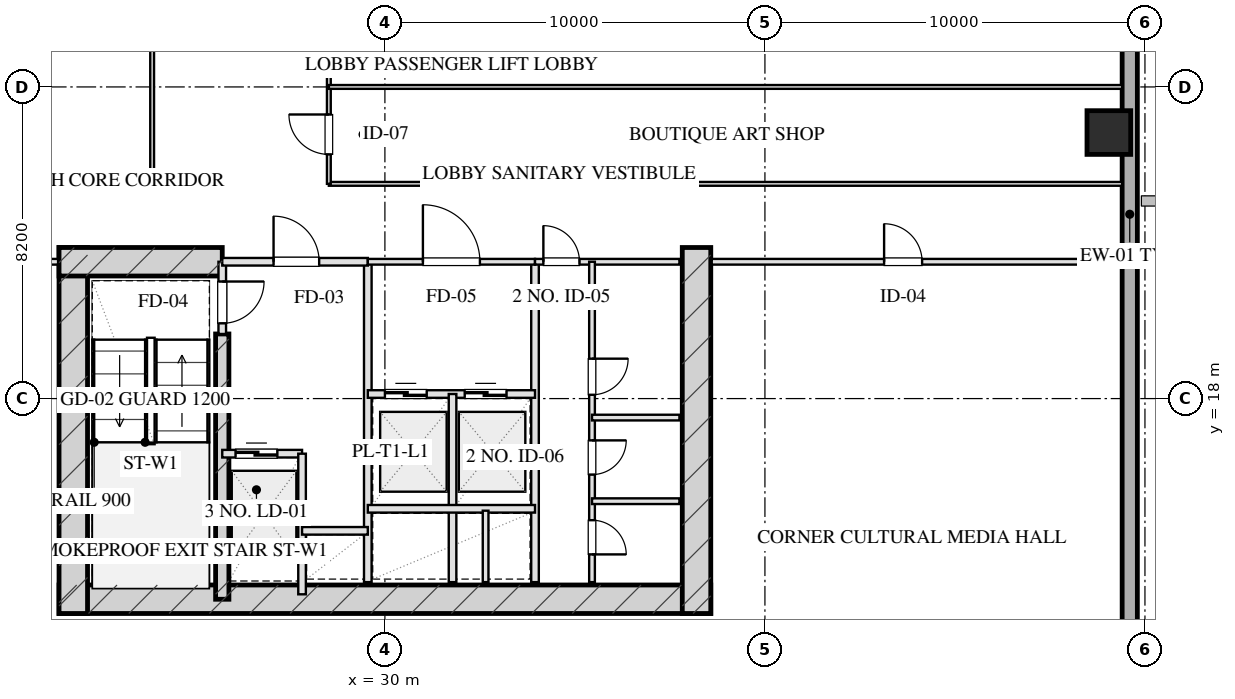
"""IFC4 building model, lengths in metres.
Left out: names, types, materials, properties, quantities, classifications, styles, units other than length and angle.
Written with IfcOpenShell. Run it as: python <this file> out.ifc"""

import sys

from ifc_helpers import new_model, si_unit, direction, frame, frame_2d, origin, origin_2d, place, context, subcontext, project, spatial, rectangle, hollow_rectangle, extrude, element, fill, save


model = new_model("IFC4")
c1 = context("Model", 3, precision=1e-05, world=origin(), true_north=direction((0.0, 1.0)))
c2 = subcontext(c1, "Body", "Model", "MODEL_VIEW")
j1 = project(units=[si_unit("LENGTHUNIT", "METRE"), si_unit("PLANEANGLEUNIT", "RADIAN")], contexts=[c1])
p1 = place(None, origin())
s1 = spatial("IfcSite", under=j1, at=p1, CompositionType="ELEMENT")
p2 = place(p1, origin())
s2 = spatial("IfcBuilding", under=s1, at=p2, CompositionType="ELEMENT")
p3 = place(p2, frame((0.0, 0.0, 78.2)))
s3 = spatial("IfcBuildingStorey", under=s2, at=p3, CompositionType="ELEMENT", Elevation=78.2)
p4 = place(p3, frame((21.425, 12.72, 0.0), z_axis=(0.0, 0.0, 1.0), x_axis=(1.0, 0.0, 0.0)))
e1 = element("IfcWall", 1, at=p4, inside=s3, PredefinedType="SHEAR", context=c2, shape_type="SweptSolid", body=[
    extrude(rectangle(XDim=17.15, YDim=0.75, at=frame_2d((8.575, 0.0))), origin(), (0.0, 0.0, 1.0), 3.45),
])
for number, where, z_axis, x_axis in (
    (2, (21.8, 21.975, 0.0), (0.0, 0.0, 1.0), (0.0, -1.0, 0.0)),
    (3, (38.2, 21.975, 0.0), (0.0, 0.0, 1.0), (0.0, -1.0, 0.0)),
):
    element("IfcWall", number, at=place(p3, frame(where, z_axis=z_axis, x_axis=x_axis)), inside=s3, PredefinedType="SHEAR", context=c2, shape_type="SweptSolid", body=[
        extrude(rectangle(XDim=9.63, YDim=0.75, at=frame_2d((4.815, 0.0))), origin(), (0.0, 0.0, 1.0), 3.45),
    ])
p5 = place(p3, frame((25.72, 19.7, 0.0), z_axis=(0.0, 0.0, 1.0), x_axis=(0.0, -1.0, 0.0)))
e4 = element("IfcWall", 4, at=p5, inside=s3, PredefinedType="SHEAR", context=c2, shape_type="SweptSolid", body=[
    extrude(rectangle(XDim=6.98, YDim=0.35, at=frame_2d((3.49, 0.0))), origin(), (0.0, 0.0, 1.0), 3.45),
])
p6 = place(p3, frame((21.425, 21.6, 0.0), z_axis=(0.0, 0.0, 1.0), x_axis=(1.0, 0.0, 0.0)))
e5 = element("IfcWall", 5, at=p6, inside=s3, PredefinedType="SHEAR", context=c2, shape_type="SweptSolid", body=[
    extrude(rectangle(XDim=4.295, YDim=0.75, at=frame_2d((2.147, 0.0))), origin(), (0.0, 0.0, 1.0), 3.45),
])
p7 = place(p3, frame((49.05, 25.0, 0.0), z_axis=(0.0, 0.0, 1.0), x_axis=(1.0, 0.0, 0.0)))
e6 = element("IfcColumn", 6, at=p7, inside=s3, PredefinedType="COLUMN", context=c2, shape_type="SweptSolid", body=[
    extrude(hollow_rectangle(XDim=1.15, YDim=1.15, WallThickness=0.04, at=origin_2d()), origin(), (0.0, 0.0, 1.0), 3.451),
])
p8 = place(p3, frame((49.6, 60.8, 0.0), z_axis=(0.0, 0.0, 1.0), x_axis=(0.0, -1.0, 0.0)))
e7 = element("IfcWall", 7, at=p8, inside=s3, PredefinedType="SOLIDWALL", context=c2, shape_type="SweptSolid", body=[
    extrude(rectangle(XDim=53.6, YDim=0.4, at=frame_2d((26.8, 0.0))), origin(), (0.0, 0.0, 1.0), 2.61),
])
p9 = place(p8, frame((20.45, 0.0, 0.0)))
e8 = element("IfcOpeningElement", 8, at=p9, cuts=e7, PredefinedType="OPENING", context=c2, shape_type="SweptSolid", body=[
    extrude(rectangle(XDim=1.1, YDim=2.15, at=frame_2d((0.55, 1.075))), frame((0.0, 0.21, 0.0), z_axis=(0.0, -1.0, 0.0), x_axis=(1.0, 0.0, 0.0)), (0.0, 0.0, 1.0), 0.42),
])
p10 = place(p3, frame((25.72, 21.6, 0.0), z_axis=(0.0, 0.0, 1.0), x_axis=(0.0, -1.0, 0.0)))
e9 = element("IfcWall", 9, at=p10, inside=s3, PredefinedType="PARTITIONING", context=c2, shape_type="SweptSolid", body=[
    extrude(rectangle(XDim=1.9, YDim=0.2, at=frame_2d((0.95, 0.0))), origin(), (0.0, 0.0, 1.0), 3.175),
])
p11 = place(p10, frame((0.52, 0.0, 0.0)))
e10 = element("IfcOpeningElement", 10, at=p11, cuts=e9, PredefinedType="OPENING", context=c2, shape_type="SweptSolid", body=[
    extrude(rectangle(XDim=1.1, YDim=2.05, at=frame_2d((0.55, 1.025))), frame((0.0, 0.11, 0.0), z_axis=(0.0, -1.0, 0.0), x_axis=(1.0, 0.0, 0.0)), (0.0, 0.0, 1.0), 0.22),
])
p12 = place(p3, frame((29.55, 21.6, 0.0), z_axis=(0.0, 0.0, 1.0), x_axis=(0.0, -1.0, 0.0)))
e11 = element("IfcWall", 11, at=p12, inside=s3, PredefinedType="PARTITIONING", context=c2, shape_type="SweptSolid", body=[
    extrude(rectangle(XDim=8.43, YDim=0.2, at=frame_2d((4.215, 0.0))), origin(), (0.0, 0.0, 1.0), 3.175),
])
p13 = place(p3, frame((25.72, 21.6, 0.0), z_axis=(0.0, 0.0, 1.0), x_axis=(1.0, 0.0, 0.0)))
e12 = element("IfcWall", 12, at=p13, inside=s3, PredefinedType="PARTITIONING", context=c2, shape_type="SweptSolid", body=[
    extrude(rectangle(XDim=3.83, YDim=0.2, at=frame_2d((1.915, 0.0))), origin(), (0.0, 0.0, 1.0), 3.175),
])
p14 = place(p13, frame((1.35, 0.0, 0.0)))
e13 = element("IfcOpeningElement", 13, at=p14, cuts=e12, PredefinedType="OPENING", context=c2, shape_type="SweptSolid", body=[
    extrude(rectangle(XDim=1.2, YDim=2.05, at=frame_2d((0.6, 1.025))), frame((0.0, 0.11, 0.0), z_axis=(0.0, -1.0, 0.0), x_axis=(1.0, 0.0, 0.0)), (0.0, 0.0, 1.0), 0.22),
])
p15 = place(p3, frame((25.72, 16.55, 0.0), z_axis=(0.0, 0.0, 1.0), x_axis=(1.0, 0.0, 0.0)))
e14 = element("IfcWall", 14, at=p15, inside=s3, PredefinedType="PARTITIONING", context=c2, shape_type="SweptSolid", body=[
    extrude(rectangle(XDim=2.1, YDim=0.2, at=frame_2d((1.05, 0.0))), origin(), (0.0, 0.0, 1.0), 3.175),
])
p16 = place(p15, frame((0.35, 0.0, 0.0)))
e15 = element("IfcOpeningElement", 15, at=p16, cuts=e14, PredefinedType="OPENING", context=c2, shape_type="SweptSolid", body=[
    extrude(rectangle(XDim=1.1, YDim=2.05, at=frame_2d((0.55, 1.025))), frame((0.0, 0.11, 0.0), z_axis=(0.0, -1.0, 0.0), x_axis=(1.0, 0.0, 0.0)), (0.0, 0.0, 1.0), 0.22),
])
p17 = place(p3, frame((27.82, 16.55, 0.0), z_axis=(0.0, 0.0, 1.0), x_axis=(0.0, -1.0, 0.0)))
e16 = element("IfcWall", 16, at=p17, inside=s3, PredefinedType="PARTITIONING", context=c2, shape_type="SweptSolid", body=[
    extrude(rectangle(XDim=3.7, YDim=0.2, at=frame_2d((1.85, 0.0))), origin(), (0.0, 0.0, 1.0), 3.175),
])
p18 = place(p3, frame((27.82, 14.52, 0.0), z_axis=(0.0, 0.0, 1.0), x_axis=(1.0, 0.0, 0.0)))
e17 = element("IfcWall", 17, at=p18, inside=s3, PredefinedType="PARTITIONING", context=c2, shape_type="SweptSolid", body=[
    extrude(rectangle(XDim=1.73, YDim=0.2, at=frame_2d((0.865, 0.0))), origin(), (0.0, 0.0, 1.0), 3.175),
])
p19 = place(p3, frame((33.95, 21.6, 0.0), z_axis=(0.0, 0.0, 1.0), x_axis=(0.0, -1.0, 0.0)))
e18 = element("IfcWall", 18, at=p19, inside=s3, PredefinedType="PARTITIONING", context=c2, shape_type="SweptSolid", body=[
    extrude(rectangle(XDim=8.43, YDim=0.2, at=frame_2d((4.215, 0.0))), origin(), (0.0, 0.0, 1.0), 3.175),
])
p20 = place(p3, frame((29.55, 21.6, 0.0), z_axis=(0.0, 0.0, 1.0), x_axis=(1.0, 0.0, 0.0)))
e19 = element("IfcWall", 19, at=p20, inside=s3, PredefinedType="PARTITIONING", context=c2, shape_type="SweptSolid", body=[
    extrude(rectangle(XDim=4.4, YDim=0.15, at=frame_2d((2.2, 0.0))), origin(), (0.0, 0.0, 1.0), 3.175),
])
p21 = place(p20, frame((1.45, 0.0, 0.0)))
e20 = element("IfcOpeningElement", 20, at=p21, cuts=e19, PredefinedType="OPENING", context=c2, shape_type="SweptSolid", body=[
    extrude(rectangle(XDim=1.5, YDim=2.05, at=frame_2d((0.75, 1.025))), frame((0.0, 0.085, 0.0), z_axis=(0.0, -1.0, 0.0), x_axis=(1.0, 0.0, 0.0)), (0.0, 0.0, 1.0), 0.17),
])
p22 = place(p3, frame((29.55, 18.12, 0.0), z_axis=(0.0, 0.0, 1.0), x_axis=(1.0, 0.0, 0.0)))
e21 = element("IfcWall", 21, at=p22, inside=s3, PredefinedType="PARTITIONING", context=c2, shape_type="SweptSolid", body=[
    extrude(rectangle(XDim=4.4, YDim=0.2, at=frame_2d((2.2, 0.0))), origin(), (0.0, 0.0, 1.0), 3.175),
])
p23 = place(p22, frame((0.45, 0.0, 0.0)))
e22 = element("IfcOpeningElement", 22, at=p23, cuts=e21, PredefinedType="OPENING", context=c2, shape_type="SweptSolid", body=[
    extrude(rectangle(XDim=1.1, YDim=2.05, at=frame_2d((0.55, 1.025))), frame((0.0, 0.11, 0.0), z_axis=(0.0, -1.0, 0.0), x_axis=(1.0, 0.0, 0.0)), (0.0, 0.0, 1.0), 0.22),
])
p24 = place(p22, frame((2.55, 0.0, 0.0)))
e23 = element("IfcOpeningElement", 23, at=p24, cuts=e21, PredefinedType="OPENING", context=c2, shape_type="SweptSolid", body=[
    extrude(rectangle(XDim=1.1, YDim=2.05, at=frame_2d((0.55, 1.025))), frame((0.0, 0.11, 0.0), z_axis=(0.0, -1.0, 0.0), x_axis=(1.0, 0.0, 0.0)), (0.0, 0.0, 1.0), 0.22),
])
p25 = place(p3, frame((31.78, 18.12, 0.0), z_axis=(0.0, 0.0, 1.0), x_axis=(0.0, -1.0, 0.0)))
e24 = element("IfcWall", 24, at=p25, inside=s3, PredefinedType="PARTITIONING", context=c2, shape_type="SweptSolid", body=[
    extrude(rectangle(XDim=4.95, YDim=0.2, at=frame_2d((2.475, 0.0))), origin(), (0.0, 0.0, 1.0), 3.175),
])
p26 = place(p3, frame((29.55, 15.1, 0.0), z_axis=(0.0, 0.0, 1.0), x_axis=(1.0, 0.0, 0.0)))
e25 = element("IfcWall", 25, at=p26, inside=s3, PredefinedType="PARTITIONING", context=c2, shape_type="SweptSolid", body=[
    extrude(rectangle(XDim=4.4, YDim=0.2, at=frame_2d((2.2, 0.0))), origin(), (0.0, 0.0, 1.0), 3.175),
])
p27 = place(p3, frame((32.65, 15.05, 0.0), z_axis=(0.0, 0.0, 1.0), x_axis=(0.0, -1.0, 0.0)))
e26 = element("IfcWall", 26, at=p27, inside=s3, PredefinedType="PARTITIONING", context=c2, shape_type="SweptSolid", body=[
    extrude(rectangle(XDim=1.88, YDim=0.15, at=frame_2d((0.94, 0.0))), origin(), (0.0, 0.0, 1.0), 3.175),
])
p28 = place(p3, frame((33.95, 21.6, 0.0), z_axis=(0.0, 0.0, 1.0), x_axis=(1.0, 0.0, 0.0)))
e27 = element("IfcWall", 27, at=p28, inside=s3, PredefinedType="PARTITIONING", context=c2, shape_type="SweptSolid", body=[
    extrude(rectangle(XDim=3.8, YDim=0.15, at=frame_2d((1.9, 0.0))), origin(), (0.0, 0.0, 1.0), 3.175),
])
p29 = place(p28, frame((0.22, 0.0, 0.0)))
e28 = element("IfcOpeningElement", 28, at=p29, cuts=e27, PredefinedType="OPENING", context=c2, shape_type="SweptSolid", body=[
    extrude(rectangle(XDim=0.95, YDim=2.05, at=frame_2d((0.475, 1.025))), frame((0.0, 0.085, 0.0), z_axis=(0.0, -1.0, 0.0), x_axis=(1.0, 0.0, 0.0)), (0.0, 0.0, 1.0), 0.17),
])
p30 = place(p3, frame((35.45, 21.6, 0.0), z_axis=(0.0, 0.0, 1.0), x_axis=(0.0, -1.0, 0.0)))
e29 = element("IfcWall", 29, at=p30, inside=s3, PredefinedType="PARTITIONING", context=c2, shape_type="SweptSolid", body=[
    extrude(rectangle(XDim=8.43, YDim=0.15, at=frame_2d((4.215, 0.0))), origin(), (0.0, 0.0, 1.0), 2.815),
])
p31 = place(p30, frame((2.55, 0.0, 0.0)))
e30 = element("IfcOpeningElement", 30, at=p31, cuts=e29, PredefinedType="OPENING", context=c2, shape_type="SweptSolid", body=[
    extrude(rectangle(XDim=0.95, YDim=2.05, at=frame_2d((0.475, 1.025))), frame((0.0, 0.085, 0.0), z_axis=(0.0, -1.0, 0.0), x_axis=(1.0, 0.0, 0.0)), (0.0, 0.0, 1.0), 0.17),
])
p32 = place(p30, frame((4.7, 0.0, 0.0)))
e31 = element("IfcOpeningElement", 31, at=p32, cuts=e29, PredefinedType="OPENING", context=c2, shape_type="SweptSolid", body=[
    extrude(rectangle(XDim=0.9, YDim=2.05, at=frame_2d((0.45, 1.025))), frame((0.0, 0.085, 0.0), z_axis=(0.0, -1.0, 0.0), x_axis=(1.0, 0.0, 0.0)), (0.0, 0.0, 1.0), 0.17),
])
p33 = place(p30, frame((6.8, 0.0, 0.0)))
e32 = element("IfcOpeningElement", 32, at=p33, cuts=e29, PredefinedType="OPENING", context=c2, shape_type="SweptSolid", body=[
    extrude(rectangle(XDim=0.9, YDim=2.05, at=frame_2d((0.45, 1.025))), frame((0.0, 0.085, 0.0), z_axis=(0.0, -1.0, 0.0), x_axis=(1.0, 0.0, 0.0)), (0.0, 0.0, 1.0), 0.17),
])
for number, where, z_axis, x_axis in (
    (33, (35.45, 17.5, 0.0), (0.0, 0.0, 1.0), (1.0, 0.0, 0.0)),
    (34, (35.45, 15.3, 0.0), (0.0, 0.0, 1.0), (1.0, 0.0, 0.0)),
):
    element("IfcWall", number, at=place(p3, frame(where, z_axis=z_axis, x_axis=x_axis)), inside=s3, PredefinedType="PARTITIONING", context=c2, shape_type="SweptSolid", body=[
        extrude(rectangle(XDim=2.3, YDim=0.15, at=frame_2d((1.15, 0.0))), origin(), (0.0, 0.0, 1.0), 3.175),
    ])
p34 = place(p3, frame((10.6, 21.6, 0.0), z_axis=(0.0, 0.0, 1.0), x_axis=(1.0, 0.0, 0.0)))
e35 = element("IfcWall", 35, at=p34, inside=s3, PredefinedType="PARTITIONING", context=c2, shape_type="SweptSolid", body=[
    extrude(rectangle(XDim=10.8, YDim=0.15, at=frame_2d((5.4, 0.0))), origin(), (0.0, 0.0, 1.0), 3.175),
])
p35 = place(p34, frame((4.536, 0.0, 0.0)))
e36 = element("IfcOpeningElement", 36, at=p35, cuts=e35, PredefinedType="OPENING", context=c2, shape_type="SweptSolid", body=[
    extrude(rectangle(XDim=1.0, YDim=2.05, at=frame_2d((0.5, 1.025))), frame((0.0, 0.085, 0.0), z_axis=(0.0, -1.0, 0.0), x_axis=(1.0, 0.0, 0.0)), (0.0, 0.0, 1.0), 0.17),
])
p36 = place(p3, frame((38.6, 21.6, 0.0), z_axis=(0.0, 0.0, 1.0), x_axis=(1.0, 0.0, 0.0)))
e37 = element("IfcWall", 37, at=p36, inside=s3, PredefinedType="PARTITIONING", context=c2, shape_type="SweptSolid", body=[
    extrude(rectangle(XDim=10.8, YDim=0.15, at=frame_2d((5.4, 0.0))), origin(), (0.0, 0.0, 1.0), 3.175),
])
p37 = place(p36, frame((4.536, 0.0, 0.0)))
e38 = element("IfcOpeningElement", 38, at=p37, cuts=e37, PredefinedType="OPENING", context=c2, shape_type="SweptSolid", body=[
    extrude(rectangle(XDim=1.0, YDim=2.05, at=frame_2d((0.5, 1.025))), frame((0.0, 0.085, 0.0), z_axis=(0.0, -1.0, 0.0), x_axis=(1.0, 0.0, 0.0)), (0.0, 0.0, 1.0), 0.17),
])
p38 = place(p3, frame((10.6, 23.65, 0.0), z_axis=(0.0, 0.0, 1.0), x_axis=(1.0, 0.0, 0.0)))
e39 = element("IfcWall", 39, at=p38, inside=s3, PredefinedType="MOVABLE", context=c2, shape_type="SweptSolid", body=[
    extrude(rectangle(XDim=13.275, YDim=0.1, at=frame_2d((6.637, 0.0))), origin(), (0.0, 0.0, 1.0), 3.175),
])
p39 = place(p3, frame((28.525, 23.65, 0.0), z_axis=(0.0, 0.0, 1.0), x_axis=(1.0, 0.0, 0.0)))
e40 = element("IfcWall", 40, at=p39, inside=s3, PredefinedType="MOVABLE", context=c2, shape_type="SweptSolid", body=[
    extrude(rectangle(XDim=20.875, YDim=0.1, at=frame_2d((10.438, 0.0))), origin(), (0.0, 0.0, 1.0), 3.175),
])
p40 = place(p3, frame((23.875, 23.65, 0.0), z_axis=(0.0, 0.0, 1.0), x_axis=(0.0, 1.0, 0.0)))
e41 = element("IfcWall", 41, at=p40, inside=s3, PredefinedType="MOVABLE", context=c2, shape_type="SweptSolid", body=[
    extrude(rectangle(XDim=20.7, YDim=0.1, at=frame_2d((10.35, 0.0))), origin(), (0.0, 0.0, 1.0), 3.175),
])
p41 = place(p40, frame((4.075, 0.0, 0.0)))
e42 = element("IfcOpeningElement", 42, at=p41, cuts=e41, PredefinedType="OPENING", context=c2, shape_type="SweptSolid", body=[
    extrude(rectangle(XDim=1.0, YDim=2.05, at=frame_2d((0.5, 1.025))), frame((0.0, 0.06, 0.0), z_axis=(0.0, -1.0, 0.0), x_axis=(1.0, 0.0, 0.0)), (0.0, 0.0, 1.0), 0.12),
])
p42 = place(p40, frame((14.425, 0.0, 0.0)))
e43 = element("IfcOpeningElement", 43, at=p42, cuts=e41, PredefinedType="OPENING", context=c2, shape_type="SweptSolid", body=[
    extrude(rectangle(XDim=1.0, YDim=2.05, at=frame_2d((0.5, 1.025))), frame((0.0, 0.06, 0.0), z_axis=(0.0, -1.0, 0.0), x_axis=(1.0, 0.0, 0.0)), (0.0, 0.0, 1.0), 0.12),
])
p43 = place(p3, frame((28.525, 23.65, 0.0), z_axis=(0.0, 0.0, 1.0), x_axis=(0.0, 1.0, 0.0)))
e44 = element("IfcWall", 44, at=p43, inside=s3, PredefinedType="MOVABLE", context=c2, shape_type="SweptSolid", body=[
    extrude(rectangle(XDim=20.7, YDim=0.1, at=frame_2d((10.35, 0.0))), origin(), (0.0, 0.0, 1.0), 3.175),
])
p44 = place(p43, frame((0.775, 0.0, 0.0)))
e45 = element("IfcOpeningElement", 45, at=p44, cuts=e44, PredefinedType="OPENING", context=c2, shape_type="SweptSolid", body=[
    extrude(rectangle(XDim=1.05, YDim=2.05, at=frame_2d((0.525, 1.025))), frame((0.0, 0.06, 0.0), z_axis=(0.0, -1.0, 0.0), x_axis=(1.0, 0.0, 0.0)), (0.0, 0.0, 1.0), 0.12),
])
p45 = place(p43, frame((3.95, 0.0, 0.0)))
e46 = element("IfcOpeningElement", 46, at=p45, cuts=e44, PredefinedType="OPENING", context=c2, shape_type="SweptSolid", body=[
    extrude(rectangle(XDim=1.0, YDim=2.05, at=frame_2d((0.5, 1.025))), frame((0.0, 0.06, 0.0), z_axis=(0.0, -1.0, 0.0), x_axis=(1.0, 0.0, 0.0)), (0.0, 0.0, 1.0), 0.12),
])
p46 = place(p43, frame((7.51, 0.0, 0.0)))
e47 = element("IfcOpeningElement", 47, at=p46, cuts=e44, PredefinedType="OPENING", context=c2, shape_type="SweptSolid", body=[
    extrude(rectangle(XDim=1.0, YDim=2.05, at=frame_2d((0.5, 1.025))), frame((0.0, 0.06, 0.0), z_axis=(0.0, -1.0, 0.0), x_axis=(1.0, 0.0, 0.0)), (0.0, 0.0, 1.0), 0.12),
])
p47 = place(p43, frame((11.51, 0.0, 0.0)))
e48 = element("IfcOpeningElement", 48, at=p47, cuts=e44, PredefinedType="OPENING", context=c2, shape_type="SweptSolid", body=[
    extrude(rectangle(XDim=1.0, YDim=2.05, at=frame_2d((0.5, 1.025))), frame((0.0, 0.06, 0.0), z_axis=(0.0, -1.0, 0.0), x_axis=(1.0, 0.0, 0.0)), (0.0, 0.0, 1.0), 0.12),
])
p48 = place(p43, frame((15.75, 0.0, 0.0)))
e49 = element("IfcOpeningElement", 49, at=p48, cuts=e44, PredefinedType="OPENING", context=c2, shape_type="SweptSolid", body=[
    extrude(rectangle(XDim=1.0, YDim=2.05, at=frame_2d((0.5, 1.025))), frame((0.0, 0.06, 0.0), z_axis=(0.0, -1.0, 0.0), x_axis=(1.0, 0.0, 0.0)), (0.0, 0.0, 1.0), 0.12),
])
p49 = place(p43, frame((19.185, 0.0, 0.0)))
e50 = element("IfcOpeningElement", 50, at=p49, cuts=e44, PredefinedType="OPENING", context=c2, shape_type="SweptSolid", body=[
    extrude(rectangle(XDim=1.0, YDim=2.05, at=frame_2d((0.5, 1.025))), frame((0.0, 0.06, 0.0), z_axis=(0.0, -1.0, 0.0), x_axis=(1.0, 0.0, 0.0)), (0.0, 0.0, 1.0), 0.12),
])
p50 = place(p3, frame((28.525, 26.2, 0.0), z_axis=(0.0, 0.0, 1.0), x_axis=(1.0, 0.0, 0.0)))
e51 = element("IfcWall", 51, at=p50, inside=s3, PredefinedType="MOVABLE", context=c2, shape_type="SweptSolid", body=[
    extrude(rectangle(XDim=20.875, YDim=0.1, at=frame_2d((10.438, 0.0))), origin(), (0.0, 0.0, 1.0), 3.175),
])
p51 = place(p11, origin())
e52 = element("IfcDoor", 52, at=p51, inside=s3, OperationType="SINGLE_SWING_LEFT", PredefinedType="DOOR", context=c2, shape_type="SweptSolid", body=[
    extrude(rectangle(XDim=1.1, YDim=2.05, at=frame_2d((0.55, 1.025))), frame((0.0, 0.025, 0.0), z_axis=(0.0, -1.0, 0.0), x_axis=(1.0, 0.0, 0.0)), (0.0, 0.0, 1.0), 0.05),
])
fill(e10, e52)
p52 = place(p14, origin())
e53 = element("IfcDoor", 53, at=p52, inside=s3, OperationType="SINGLE_SWING_LEFT", PredefinedType="DOOR", context=c2, shape_type="SweptSolid", body=[
    extrude(rectangle(XDim=1.2, YDim=2.05, at=frame_2d((0.6, 1.025))), frame((0.0, 0.025, 0.0), z_axis=(0.0, -1.0, 0.0), x_axis=(1.0, 0.0, 0.0)), (0.0, 0.0, 1.0), 0.05),
])
fill(e13, e53)
p53 = place(p16, origin())
e54 = element("IfcDoor", 54, at=p53, inside=s3, OperationType="DOUBLE_DOOR_SLIDING", PredefinedType="DOOR", context=c2, shape_type="SweptSolid", body=[
    extrude(rectangle(XDim=1.1, YDim=2.05, at=frame_2d((0.55, 1.025))), frame((0.0, 0.025, 0.0), z_axis=(0.0, -1.0, 0.0), x_axis=(1.0, 0.0, 0.0)), (0.0, 0.0, 1.0), 0.05),
])
fill(e15, e54)
p54 = place(p21, origin())
e55 = element("IfcDoor", 55, at=p54, inside=s3, OperationType="SINGLE_SWING_LEFT", PredefinedType="DOOR", context=c2, shape_type="SweptSolid", body=[
    extrude(rectangle(XDim=1.5, YDim=2.05, at=frame_2d((0.75, 1.025))), frame((0.0, 0.025, 0.0), z_axis=(0.0, -1.0, 0.0), x_axis=(1.0, 0.0, 0.0)), (0.0, 0.0, 1.0), 0.05),
])
fill(e20, e55)
p55 = place(p23, origin())
e56 = element("IfcDoor", 56, at=p55, inside=s3, OperationType="DOUBLE_DOOR_SLIDING", PredefinedType="DOOR", context=c2, shape_type="SweptSolid", body=[
    extrude(rectangle(XDim=1.1, YDim=2.05, at=frame_2d((0.55, 1.025))), frame((0.0, 0.025, 0.0), z_axis=(0.0, -1.0, 0.0), x_axis=(1.0, 0.0, 0.0)), (0.0, 0.0, 1.0), 0.05),
])
fill(e22, e56)
p56 = place(p24, origin())
e57 = element("IfcDoor", 57, at=p56, inside=s3, OperationType="DOUBLE_DOOR_SLIDING", PredefinedType="DOOR", context=c2, shape_type="SweptSolid", body=[
    extrude(rectangle(XDim=1.1, YDim=2.05, at=frame_2d((0.55, 1.025))), frame((0.0, 0.025, 0.0), z_axis=(0.0, -1.0, 0.0), x_axis=(1.0, 0.0, 0.0)), (0.0, 0.0, 1.0), 0.05),
])
fill(e23, e57)
p57 = place(p29, origin())
e58 = element("IfcDoor", 58, at=p57, inside=s3, OperationType="SINGLE_SWING_LEFT", PredefinedType="DOOR", context=c2, shape_type="SweptSolid", body=[
    extrude(rectangle(XDim=0.95, YDim=2.05, at=frame_2d((0.475, 1.025))), frame((0.0, 0.025, 0.0), z_axis=(0.0, -1.0, 0.0), x_axis=(1.0, 0.0, 0.0)), (0.0, 0.0, 1.0), 0.05),
])
fill(e28, e58)
p58 = place(p31, origin())
e59 = element("IfcDoor", 59, at=p58, inside=s3, OperationType="SINGLE_SWING_LEFT", PredefinedType="DOOR", context=c2, shape_type="SweptSolid", body=[
    extrude(rectangle(XDim=0.95, YDim=2.05, at=frame_2d((0.475, 1.025))), frame((0.0, 0.025, 0.0), z_axis=(0.0, -1.0, 0.0), x_axis=(1.0, 0.0, 0.0)), (0.0, 0.0, 1.0), 0.05),
])
fill(e30, e59)
p59 = place(p32, origin())
e60 = element("IfcDoor", 60, at=p59, inside=s3, OperationType="SINGLE_SWING_LEFT", PredefinedType="DOOR", context=c2, shape_type="SweptSolid", body=[
    extrude(rectangle(XDim=0.9, YDim=2.05, at=frame_2d((0.45, 1.025))), frame((0.0, 0.025, 0.0), z_axis=(0.0, -1.0, 0.0), x_axis=(1.0, 0.0, 0.0)), (0.0, 0.0, 1.0), 0.05),
])
fill(e31, e60)
p60 = place(p33, origin())
e61 = element("IfcDoor", 61, at=p60, inside=s3, OperationType="SINGLE_SWING_RIGHT", PredefinedType="DOOR", context=c2, shape_type="SweptSolid", body=[
    extrude(rectangle(XDim=0.9, YDim=2.05, at=frame_2d((0.45, 1.025))), frame((0.0, 0.025, 0.0), z_axis=(0.0, -1.0, 0.0), x_axis=(1.0, 0.0, 0.0)), (0.0, 0.0, 1.0), 0.05),
])
fill(e32, e61)
p61 = place(p37, origin())
e62 = element("IfcDoor", 62, at=p61, inside=s3, OperationType="SINGLE_SWING_LEFT", PredefinedType="DOOR", context=c2, shape_type="SweptSolid", body=[
    extrude(rectangle(XDim=1.0, YDim=2.05, at=frame_2d((0.5, 1.025))), frame((0.0, 0.025, 0.0), z_axis=(0.0, -1.0, 0.0), x_axis=(1.0, 0.0, 0.0)), (0.0, 0.0, 1.0), 0.05),
])
fill(e38, e62)
p62 = place(p44, origin())
e63 = element("IfcDoor", 63, at=p62, inside=s3, OperationType="SINGLE_SWING_RIGHT", PredefinedType="DOOR", context=c2, shape_type="SweptSolid", body=[
    extrude(rectangle(XDim=1.05, YDim=2.05, at=frame_2d((0.525, 1.025))), frame((0.0, 0.025, 0.0), z_axis=(0.0, -1.0, 0.0), x_axis=(1.0, 0.0, 0.0)), (0.0, 0.0, 1.0), 0.05),
])
fill(e45, e63)
save(model, sys.argv[1])
